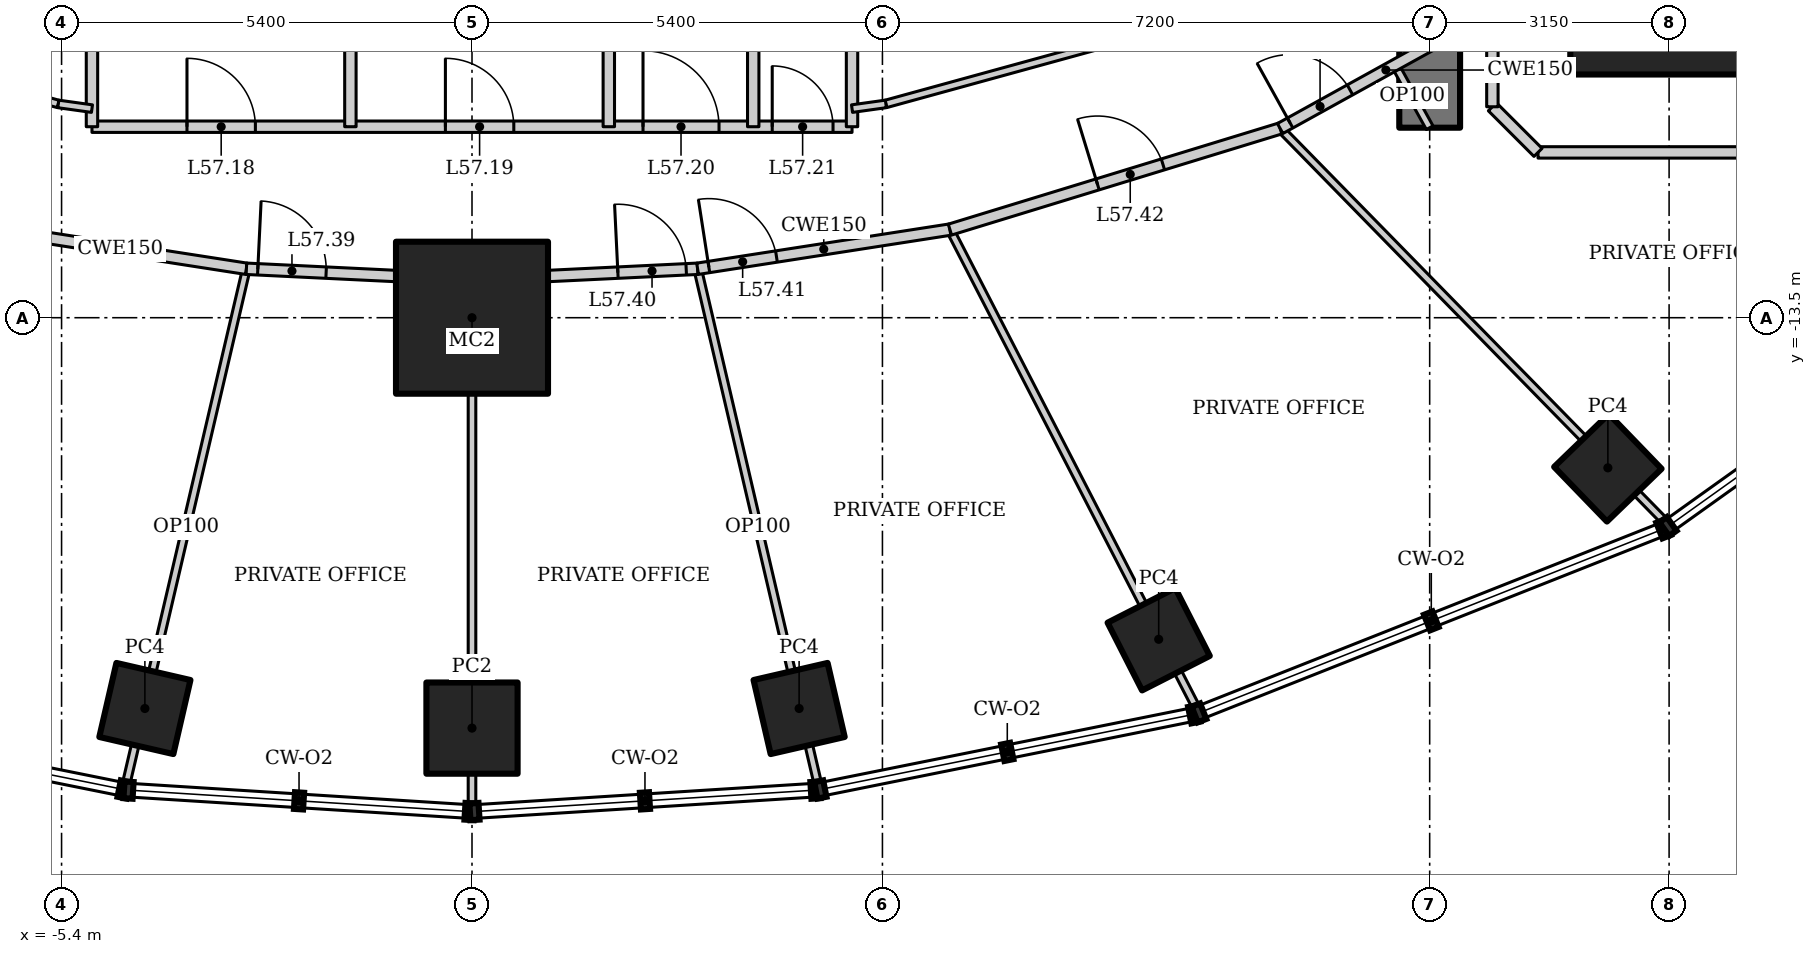
"""IFC4 building model, lengths in metres.
Left out: names, types, materials, properties, quantities, classifications, styles, units other than length and angle.
Written with IfcOpenShell. Run it as: python <this file> out.ifc"""

import sys

from ifc_helpers import new_model, si_unit, direction, frame, frame_2d, origin, origin_2d, place, context, subcontext, project, spatial, rectangle, hollow_rectangle, extrude, element, fill, save


model = new_model("IFC4")
c1 = context("Model", 3, precision=1e-05, world=origin(), true_north=direction((0.0, 1.0)))
c2 = subcontext(c1, "Body", "Model", "MODEL_VIEW")
j1 = project(units=[si_unit("LENGTHUNIT", "METRE"), si_unit("PLANEANGLEUNIT", "RADIAN")], contexts=[c1])
p1 = place(None, origin())
s1 = spatial("IfcSite", under=j1, at=p1, CompositionType="ELEMENT")
p2 = place(p1, origin())
s2 = spatial("IfcBuilding", under=s1, at=p2, CompositionType="ELEMENT")
p3 = place(p2, frame((0.0, 0.0, 245.2)))
s3 = spatial("IfcBuildingStorey", under=s2, at=p3, CompositionType="ELEMENT", Elevation=245.2)
p4 = place(p3, frame((0.0, -13.5, 0.0), z_axis=(0.0, 0.0, 1.0), x_axis=(1.0, 0.0, 0.0)))
e1 = element("IfcColumn", 1, at=p4, inside=s3, PredefinedType="COLUMN", context=c2, shape_type="SweptSolid", body=[
    extrude(hollow_rectangle(XDim=2.0, YDim=2.0, WallThickness=0.17, at=origin_2d()), origin(), (0.0, 0.0, 1.0), 4.2),
])
p5 = place(p3, frame((15.75, -9.0, 0.0), z_axis=(0.0, 0.0, 1.0), x_axis=(1.0, 0.0, 0.0)))
e2 = element("IfcColumn", 2, at=p5, inside=s3, PredefinedType="COLUMN", context=c2, shape_type="SweptSolid", body=[
    extrude(hollow_rectangle(XDim=2.6, YDim=2.6, WallThickness=0.13, at=origin_2d()), origin(), (0.0, 0.0, 1.0), 4.2),
])
p6 = place(p3, frame((-4.304, -18.642, 0.0), z_axis=(0.0, 0.0, 1.0), x_axis=(0.224951054344, 0.974370064785, 0.0)))
e3 = element("IfcColumn", 3, at=p6, inside=s3, PredefinedType="COLUMN", context=c2, shape_type="SweptSolid", body=[
    extrude(hollow_rectangle(XDim=1.0, YDim=1.0, WallThickness=0.08, at=origin_2d()), origin(), (0.0, 0.0, 1.0), 4.2),
])
p7 = place(p3, frame((0.0, -18.9, 0.0), z_axis=(0.0, 0.0, 1.0), x_axis=(1.0, 0.0, 0.0)))
e4 = element("IfcColumn", 4, at=p7, inside=s3, PredefinedType="COLUMN", context=c2, shape_type="SweptSolid", body=[
    extrude(hollow_rectangle(XDim=1.2, YDim=1.2, WallThickness=0.1, at=origin_2d()), origin(), (0.0, 0.0, 1.0), 4.2),
])
for number, where, z_axis, x_axis in (
    (5, (4.304, -18.642, 0.0), (0.0, 0.0, 1.0), (0.974, 0.225, 0.0)),
    (6, (9.035, -17.731, 0.0), (0.0, 0.0, 1.0), (0.891, 0.454, 0.0)),
    (7, (14.944, -15.475, 0.0), (0.0, 0.0, 1.0), (0.719, 0.695, 0.0)),
):
    element("IfcColumn", number, at=place(p3, frame(where, z_axis=z_axis, x_axis=x_axis)), inside=s3, PredefinedType="COLUMN", context=c2, shape_type="SweptSolid", body=[
        extrude(hollow_rectangle(XDim=1.0, YDim=1.0, WallThickness=0.08, at=origin_2d()), origin(), (0.0, 0.0, 1.0), 4.2),
    ])
p8 = place(p3, frame((12.6, -11.0, 0.0), z_axis=(0.0, 0.0, 1.0), x_axis=(0.0, 1.0, 0.0)))
e8 = element("IfcWall", 8, at=p8, inside=s3, PredefinedType="SHEAR", context=c2, shape_type="SweptSolid", body=[
    extrude(rectangle(XDim=22.0, YDim=0.8, at=frame_2d((11.0, 0.0))), origin(), (0.0, 0.0, 1.0), 4.2),
])
p9 = place(p8, frame((10.1, 0.0, 0.0)))
e9 = element("IfcOpeningElement", 9, at=p9, cuts=e8, PredefinedType="OPENING", context=c2, shape_type="SweptSolid", body=[
    extrude(rectangle(XDim=1.8, YDim=2.1, at=frame_2d((0.9, 1.05))), frame((0.0, 0.41, 0.0), z_axis=(0.0, -1.0, 0.0), x_axis=(1.0, 0.0, 0.0)), (0.0, 0.0, 1.0), 0.82),
])
p10 = place(p3, frame((-4.556, -19.657, 0.0), z_axis=(0.0, 0.0, 1.0), x_axis=(0.22733791689, 0.973815933092, 0.0)))
e10 = element("IfcWall", 10, at=p10, inside=s3, PredefinedType="PARTITIONING", context=c2, shape_type="SweptSolid", body=[
    extrude(rectangle(XDim=6.984, YDim=0.1, at=frame_2d((3.492, 0.0))), origin(), (0.0, 0.0, 1.0), 3.293),
])
p11 = place(p3, frame((0.0, -19.945, 0.0), z_axis=(0.0, 0.0, 1.0), x_axis=(0.0, 1.0, 0.0)))
e11 = element("IfcWall", 11, at=p11, inside=s3, PredefinedType="PARTITIONING", context=c2, shape_type="SweptSolid", body=[
    extrude(rectangle(XDim=6.945, YDim=0.1, at=frame_2d((3.472, 0.0))), origin(), (0.0, 0.0, 1.0), 3.644),
])
p12 = place(p3, frame((4.556, -19.657, 0.0), z_axis=(0.0, 0.0, 1.0), x_axis=(-0.22733791689, 0.973815933092, 0.0)))
e12 = element("IfcWall", 12, at=p12, inside=s3, PredefinedType="PARTITIONING", context=c2, shape_type="SweptSolid", body=[
    extrude(rectangle(XDim=6.984, YDim=0.1, at=frame_2d((3.492, 0.0))), origin(), (0.0, 0.0, 1.0), 3.293),
])
p13 = place(p3, frame((9.54, -18.65, 0.0), z_axis=(0.0, 0.0, 1.0), x_axis=(-0.45810402165, 0.88889859115, 0.0)))
e13 = element("IfcWall", 13, at=p13, inside=s3, PredefinedType="PARTITIONING", context=c2, shape_type="SweptSolid", body=[
    extrude(rectangle(XDim=7.098, YDim=0.1, at=frame_2d((3.549, 0.0))), origin(), (0.0, 0.0, 1.0), 3.293),
])
p14 = place(p3, frame((15.709, -16.199, 0.0), z_axis=(0.0, 0.0, 1.0), x_axis=(-0.699362525935, 0.714767135029, 0.0)))
e14 = element("IfcWall", 14, at=p14, inside=s3, PredefinedType="PARTITIONING", context=c2, shape_type="SweptSolid", body=[
    extrude(rectangle(XDim=7.259, YDim=0.1, at=frame_2d((3.629, 0.0))), origin(), (0.0, 0.0, 1.0), 3.41),
])
p15 = place(p3, frame((-6.288, -12.341, 0.0), z_axis=(0.0, 0.0, 1.0), x_axis=(0.988174283057, -0.153334882869, 0.0)))
e15 = element("IfcWall", 15, at=p15, inside=s3, PredefinedType="PARTITIONING", context=c2, shape_type="SweptSolid", body=[
    extrude(rectangle(XDim=3.36, YDim=0.15, at=frame_2d((1.68, 0.0))), origin(), (0.0, 0.0, 1.0), 4.05),
])
p16 = place(p3, frame((-2.968, -12.856, 0.0), z_axis=(0.0, 0.0, 1.0), x_axis=(0.998824412818, -0.04847465687, 0.0)))
e16 = element("IfcWall", 16, at=p16, inside=s3, PredefinedType="PARTITIONING", context=c2, shape_type="SweptSolid", body=[
    extrude(rectangle(XDim=2.971, YDim=0.15, at=frame_2d((1.486, 0.0))), origin(), (0.0, 0.0, 1.0), 4.05),
])
p17 = place(p16, frame((0.15, 0.0, 0.0)))
e17 = element("IfcOpeningElement", 17, at=p17, cuts=e16, PredefinedType="OPENING", context=c2, shape_type="SweptSolid", body=[
    extrude(rectangle(XDim=0.9, YDim=2.1, at=frame_2d((0.45, 1.05))), frame((0.0, 0.085, 0.0), z_axis=(0.0, -1.0, 0.0), x_axis=(1.0, 0.0, 0.0)), (0.0, 0.0, 1.0), 0.17),
])
p18 = place(p3, frame((0.0, -13.0, 0.0), z_axis=(0.0, 0.0, 1.0), x_axis=(0.998824412818, 0.04847465687, 0.0)))
e18 = element("IfcWall", 18, at=p18, inside=s3, PredefinedType="PARTITIONING", context=c2, shape_type="SweptSolid", body=[
    extrude(rectangle(XDim=2.971, YDim=0.15, at=frame_2d((1.486, 0.0))), origin(), (0.0, 0.0, 1.0), 4.05),
])
p19 = place(p18, frame((1.921, 0.0, 0.0)))
e19 = element("IfcOpeningElement", 19, at=p19, cuts=e18, PredefinedType="OPENING", context=c2, shape_type="SweptSolid", body=[
    extrude(rectangle(XDim=0.9, YDim=2.1, at=frame_2d((0.45, 1.05))), frame((0.0, 0.085, 0.0), z_axis=(0.0, -1.0, 0.0), x_axis=(1.0, 0.0, 0.0)), (0.0, 0.0, 1.0), 0.17),
])
p20 = place(p3, frame((2.968, -12.856, 0.0), z_axis=(0.0, 0.0, 1.0), x_axis=(0.988174283057, 0.153334882869, 0.0)))
e20 = element("IfcWall", 20, at=p20, inside=s3, PredefinedType="PARTITIONING", context=c2, shape_type="SweptSolid", body=[
    extrude(rectangle(XDim=3.36, YDim=0.15, at=frame_2d((1.68, 0.0))), origin(), (0.0, 0.0, 1.0), 4.05),
])
p21 = place(p20, frame((0.15, 0.0, 0.0)))
e21 = element("IfcOpeningElement", 21, at=p21, cuts=e20, PredefinedType="OPENING", context=c2, shape_type="SweptSolid", body=[
    extrude(rectangle(XDim=0.9, YDim=2.1, at=frame_2d((0.45, 1.05))), frame((0.0, 0.085, 0.0), z_axis=(0.0, -1.0, 0.0), x_axis=(1.0, 0.0, 0.0)), (0.0, 0.0, 1.0), 0.17),
])
p22 = place(p3, frame((6.288, -12.341, 0.0), z_axis=(0.0, 0.0, 1.0), x_axis=(0.956185837153, 0.292760388079, 0.0)))
e22 = element("IfcWall", 22, at=p22, inside=s3, PredefinedType="PARTITIONING", context=c2, shape_type="SweptSolid", body=[
    extrude(rectangle(XDim=4.544, YDim=0.15, at=frame_2d((2.272, 0.0))), origin(), (0.0, 0.0, 1.0), 4.05),
])
p23 = place(p22, frame((2.031, 0.0, 0.0)))
e23 = element("IfcOpeningElement", 23, at=p23, cuts=e22, PredefinedType="OPENING", context=c2, shape_type="SweptSolid", body=[
    extrude(rectangle(XDim=0.9, YDim=2.1, at=frame_2d((0.45, 1.05))), frame((0.0, 0.085, 0.0), z_axis=(0.0, -1.0, 0.0), x_axis=(1.0, 0.0, 0.0)), (0.0, 0.0, 1.0), 0.17),
])
p24 = place(p3, frame((-5.0, -10.987, 0.0), z_axis=(0.0, 0.0, 1.0), x_axis=(1.0, 0.0, 0.0)))
e24 = element("IfcWall", 24, at=p24, inside=s3, PredefinedType="SOLIDWALL", context=c2, shape_type="SweptSolid", body=[
    extrude(rectangle(XDim=10.0, YDim=0.15, at=frame_2d((5.0, 0.0))), origin(), (0.0, 0.0, 1.0), 4.05),
])
p25 = place(p24, frame((1.25, 0.0, 0.0)))
e25 = element("IfcOpeningElement", 25, at=p25, cuts=e24, PredefinedType="OPENING", context=c2, shape_type="SweptSolid", body=[
    extrude(rectangle(XDim=0.9, YDim=2.1, at=frame_2d((0.45, 1.05))), frame((0.0, 0.085, 0.0), z_axis=(0.0, -1.0, 0.0), x_axis=(1.0, 0.0, 0.0)), (0.0, 0.0, 1.0), 0.17),
])
p26 = place(p24, frame((4.65, 0.0, 0.0)))
e26 = element("IfcOpeningElement", 26, at=p26, cuts=e24, PredefinedType="OPENING", context=c2, shape_type="SweptSolid", body=[
    extrude(rectangle(XDim=0.9, YDim=2.1, at=frame_2d((0.45, 1.05))), frame((0.0, 0.085, 0.0), z_axis=(0.0, -1.0, 0.0), x_axis=(1.0, 0.0, 0.0)), (0.0, 0.0, 1.0), 0.17),
])
p27 = place(p24, frame((7.25, 0.0, 0.0)))
e27 = element("IfcOpeningElement", 27, at=p27, cuts=e24, PredefinedType="OPENING", context=c2, shape_type="SweptSolid", body=[
    extrude(rectangle(XDim=1.0, YDim=2.1, at=frame_2d((0.5, 1.05))), frame((0.0, 0.085, 0.0), z_axis=(0.0, -1.0, 0.0), x_axis=(1.0, 0.0, 0.0)), (0.0, 0.0, 1.0), 0.17),
])
p28 = place(p24, frame((8.95, 0.0, 0.0)))
e28 = element("IfcOpeningElement", 28, at=p28, cuts=e24, PredefinedType="OPENING", context=c2, shape_type="SweptSolid", body=[
    extrude(rectangle(XDim=0.8, YDim=2.1, at=frame_2d((0.4, 1.05))), frame((0.0, 0.085, 0.0), z_axis=(0.0, -1.0, 0.0), x_axis=(1.0, 0.0, 0.0)), (0.0, 0.0, 1.0), 0.17),
])
for number, where, z_axis, x_axis in (
    (29, (-5.0, -7.8, 0.0), (0.0, 0.0, 1.0), (0.0, -1.0, 0.0)),
    (30, (5.0, -7.8, 0.0), (0.0, 0.0, 1.0), (0.0, -1.0, 0.0)),
    (31, (-1.6, -7.8, 0.0), (0.0, 0.0, 1.0), (0.0, -1.0, 0.0)),
):
    element("IfcWall", number, at=place(p3, frame(where, z_axis=z_axis, x_axis=x_axis)), inside=s3, PredefinedType="SOLIDWALL", context=c2, shape_type="SweptSolid", body=[
        extrude(rectangle(XDim=3.187, YDim=0.15, at=frame_2d((1.594, 0.0))), origin(), (0.0, 0.0, 1.0), 4.05),
    ])
p29 = place(p3, frame((1.8, -7.8, 0.0), z_axis=(0.0, 0.0, 1.0), x_axis=(0.0, -1.0, 0.0)))
e32 = element("IfcWall", 32, at=p29, inside=s3, PredefinedType="SOLIDWALL", context=c2, shape_type="SweptSolid", body=[
    extrude(rectangle(XDim=3.187, YDim=0.15, at=frame_2d((1.594, 0.0))), origin(), (0.0, 0.0, 1.0), 3.293),
])
p30 = place(p3, frame((3.7, -7.8, 0.0), z_axis=(0.0, 0.0, 1.0), x_axis=(0.0, -1.0, 0.0)))
e33 = element("IfcWall", 33, at=p30, inside=s3, PredefinedType="SOLIDWALL", context=c2, shape_type="SweptSolid", body=[
    extrude(rectangle(XDim=3.187, YDim=0.15, at=frame_2d((1.594, 0.0))), origin(), (0.0, 0.0, 1.0), 4.05),
])
p31 = place(p3, frame((-5.0, -10.749, 0.0), z_axis=(0.0, 0.0, 1.0), x_axis=(-0.990442882696, 0.137923515463, 0.0)))
e34 = element("IfcWall", 34, at=p31, inside=s3, PredefinedType="PARTITIONING", context=c2, shape_type="SweptSolid", body=[
    extrude(rectangle(XDim=0.45, YDim=0.1, at=frame_2d((0.225, 0.0))), origin(), (0.0, 0.0, 1.0), 4.05),
])
for number, where, z_axis, x_axis in (
    (35, (-5.445, -10.687, 0.0), (0.0, 0.0, 1.0), (-0.964, 0.265, 0.0)),
    (36, (9.298, -9.628, 0.0), (0.0, 0.0, 1.0), (-0.964, -0.265, 0.0)),
):
    element("IfcWall", number, at=place(p3, frame(where, z_axis=z_axis, x_axis=x_axis)), inside=s3, PredefinedType="PARTITIONING", context=c2, shape_type="SweptSolid", body=[
        extrude(rectangle(XDim=3.995, YDim=0.1, at=frame_2d((1.998, 0.0))), origin(), (0.0, 0.0, 1.0), 4.05),
    ])
p32 = place(p3, frame((5.445, -10.687, 0.0), z_axis=(0.0, 0.0, 1.0), x_axis=(-0.990442882696, -0.137923515463, 0.0)))
e37 = element("IfcWall", 37, at=p32, inside=s3, PredefinedType="PARTITIONING", context=c2, shape_type="SweptSolid", body=[
    extrude(rectangle(XDim=0.45, YDim=0.1, at=frame_2d((0.225, 0.0))), origin(), (0.0, 0.0, 1.0), 4.05),
])
p33 = place(p3, frame((12.6, -11.0, 0.0), z_axis=(0.0, 0.0, 1.0), x_axis=(-0.484103558985, 0.875010710893, 0.0)))
e38 = element("IfcWall", 38, at=p33, inside=s3, PredefinedType="PARTITIONING", context=c2, shape_type="SweptSolid", body=[
    extrude(rectangle(XDim=0.943, YDim=0.1, at=frame_2d((0.472, 0.0))), origin(), (0.0, 0.0, 1.0), 4.05),
])
p34 = place(p3, frame((10.633, -11.01, 0.0), z_axis=(0.0, 0.0, 1.0), x_axis=(0.875072100837, 0.483992580869, 0.0)))
e39 = element("IfcWall", 39, at=p34, inside=s3, PredefinedType="PARTITIONING", context=c2, shape_type="SweptSolid", body=[
    extrude(rectangle(XDim=3.179, YDim=0.15, at=frame_2d((1.59, 0.0))), origin(), (0.0, 0.0, 1.0), 4.05),
])
p35 = place(p34, frame((0.15, 0.0, 0.0)))
e40 = element("IfcOpeningElement", 40, at=p35, cuts=e39, PredefinedType="OPENING", context=c2, shape_type="SweptSolid", body=[
    extrude(rectangle(XDim=0.9, YDim=2.1, at=frame_2d((0.45, 1.05))), frame((0.0, 0.085, 0.0), z_axis=(0.0, -1.0, 0.0), x_axis=(1.0, 0.0, 0.0)), (0.0, 0.0, 1.0), 0.17),
])
p36 = place(p3, frame((17.475, -11.325, 0.0), z_axis=(0.0, 0.0, 1.0), x_axis=(-1.0, 0.0, 0.0)))
e41 = element("IfcWall", 41, at=p36, inside=s3, PredefinedType="PARTITIONING", context=c2, shape_type="SweptSolid", body=[
    extrude(rectangle(XDim=3.449, YDim=0.15, at=frame_2d((1.725, 0.0))), origin(), (0.0, 0.0, 1.0), 4.05),
])
p37 = place(p3, frame((14.025, -11.325, 0.0), z_axis=(0.0, 0.0, 1.0), x_axis=(-0.707106781187, 0.707106781187, 0.0)))
e42 = element("IfcWall", 42, at=p37, inside=s3, PredefinedType="PARTITIONING", context=c2, shape_type="SweptSolid", body=[
    extrude(rectangle(XDim=0.849, YDim=0.15, at=frame_2d((0.425, 0.0))), origin(), (0.0, 0.0, 1.0), 4.05),
])
p38 = place(p3, frame((13.425, -10.725, 0.0), z_axis=(0.0, 0.0, 1.0), x_axis=(0.0, 1.0, 0.0)))
e43 = element("IfcWall", 43, at=p38, inside=s3, PredefinedType="PARTITIONING", context=c2, shape_type="SweptSolid", body=[
    extrude(rectangle(XDim=1.138, YDim=0.15, at=frame_2d((0.569, 0.0))), origin(), (0.0, 0.0, 1.0), 4.05),
])
p39 = place(p25, origin())
e44 = element("IfcDoor", 44, at=p39, inside=s3, OperationType="SINGLE_SWING_LEFT", PredefinedType="DOOR", context=c2, shape_type="SweptSolid", body=[
    extrude(rectangle(XDim=0.9, YDim=2.1, at=frame_2d((0.45, 1.05))), frame((0.0, 0.025, 0.0), z_axis=(0.0, -1.0, 0.0), x_axis=(1.0, 0.0, 0.0)), (0.0, 0.0, 1.0), 0.05),
])
fill(e25, e44)
p40 = place(p26, origin())
e45 = element("IfcDoor", 45, at=p40, inside=s3, OperationType="SINGLE_SWING_LEFT", PredefinedType="DOOR", context=c2, shape_type="SweptSolid", body=[
    extrude(rectangle(XDim=0.9, YDim=2.1, at=frame_2d((0.45, 1.05))), frame((0.0, 0.025, 0.0), z_axis=(0.0, -1.0, 0.0), x_axis=(1.0, 0.0, 0.0)), (0.0, 0.0, 1.0), 0.05),
])
fill(e26, e45)
p41 = place(p27, origin())
e46 = element("IfcDoor", 46, at=p41, inside=s3, OperationType="SINGLE_SWING_LEFT", PredefinedType="DOOR", context=c2, shape_type="SweptSolid", body=[
    extrude(rectangle(XDim=1.0, YDim=2.1, at=frame_2d((0.5, 1.05))), frame((0.0, 0.025, 0.0), z_axis=(0.0, -1.0, 0.0), x_axis=(1.0, 0.0, 0.0)), (0.0, 0.0, 1.0), 0.05),
])
fill(e27, e46)
p42 = place(p28, origin())
e47 = element("IfcDoor", 47, at=p42, inside=s3, OperationType="SINGLE_SWING_LEFT", PredefinedType="DOOR", context=c2, shape_type="SweptSolid", body=[
    extrude(rectangle(XDim=0.8, YDim=2.1, at=frame_2d((0.4, 1.05))), frame((0.0, 0.025, 0.0), z_axis=(0.0, -1.0, 0.0), x_axis=(1.0, 0.0, 0.0)), (0.0, 0.0, 1.0), 0.05),
])
fill(e28, e47)
p43 = place(p17, origin())
e48 = element("IfcDoor", 48, at=p43, inside=s3, OperationType="SINGLE_SWING_LEFT", PredefinedType="DOOR", context=c2, shape_type="SweptSolid", body=[
    extrude(rectangle(XDim=0.9, YDim=2.1, at=frame_2d((0.45, 1.05))), frame((0.0, 0.025, 0.0), z_axis=(0.0, -1.0, 0.0), x_axis=(1.0, 0.0, 0.0)), (0.0, 0.0, 1.0), 0.05),
])
fill(e17, e48)
p44 = place(p19, origin())
e49 = element("IfcDoor", 49, at=p44, inside=s3, OperationType="SINGLE_SWING_LEFT", PredefinedType="DOOR", context=c2, shape_type="SweptSolid", body=[
    extrude(rectangle(XDim=0.9, YDim=2.1, at=frame_2d((0.45, 1.05))), frame((0.0, 0.025, 0.0), z_axis=(0.0, -1.0, 0.0), x_axis=(1.0, 0.0, 0.0)), (0.0, 0.0, 1.0), 0.05),
])
fill(e19, e49)
p45 = place(p21, origin())
e50 = element("IfcDoor", 50, at=p45, inside=s3, OperationType="SINGLE_SWING_LEFT", PredefinedType="DOOR", context=c2, shape_type="SweptSolid", body=[
    extrude(rectangle(XDim=0.9, YDim=2.1, at=frame_2d((0.45, 1.05))), frame((0.0, 0.025, 0.0), z_axis=(0.0, -1.0, 0.0), x_axis=(1.0, 0.0, 0.0)), (0.0, 0.0, 1.0), 0.05),
])
fill(e21, e50)
p46 = place(p23, origin())
e51 = element("IfcDoor", 51, at=p46, inside=s3, OperationType="SINGLE_SWING_LEFT", PredefinedType="DOOR", context=c2, shape_type="SweptSolid", body=[
    extrude(rectangle(XDim=0.9, YDim=2.1, at=frame_2d((0.45, 1.05))), frame((0.0, 0.025, 0.0), z_axis=(0.0, -1.0, 0.0), x_axis=(1.0, 0.0, 0.0)), (0.0, 0.0, 1.0), 0.05),
])
fill(e23, e51)
p47 = place(p35, origin())
e52 = element("IfcDoor", 52, at=p47, inside=s3, OperationType="SINGLE_SWING_LEFT", PredefinedType="DOOR", context=c2, shape_type="SweptSolid", body=[
    extrude(rectangle(XDim=0.9, YDim=2.1, at=frame_2d((0.45, 1.05))), frame((0.0, 0.025, 0.0), z_axis=(0.0, -1.0, 0.0), x_axis=(1.0, 0.0, 0.0)), (0.0, 0.0, 1.0), 0.05),
])
fill(e40, e52)
save(model, sys.argv[1])
